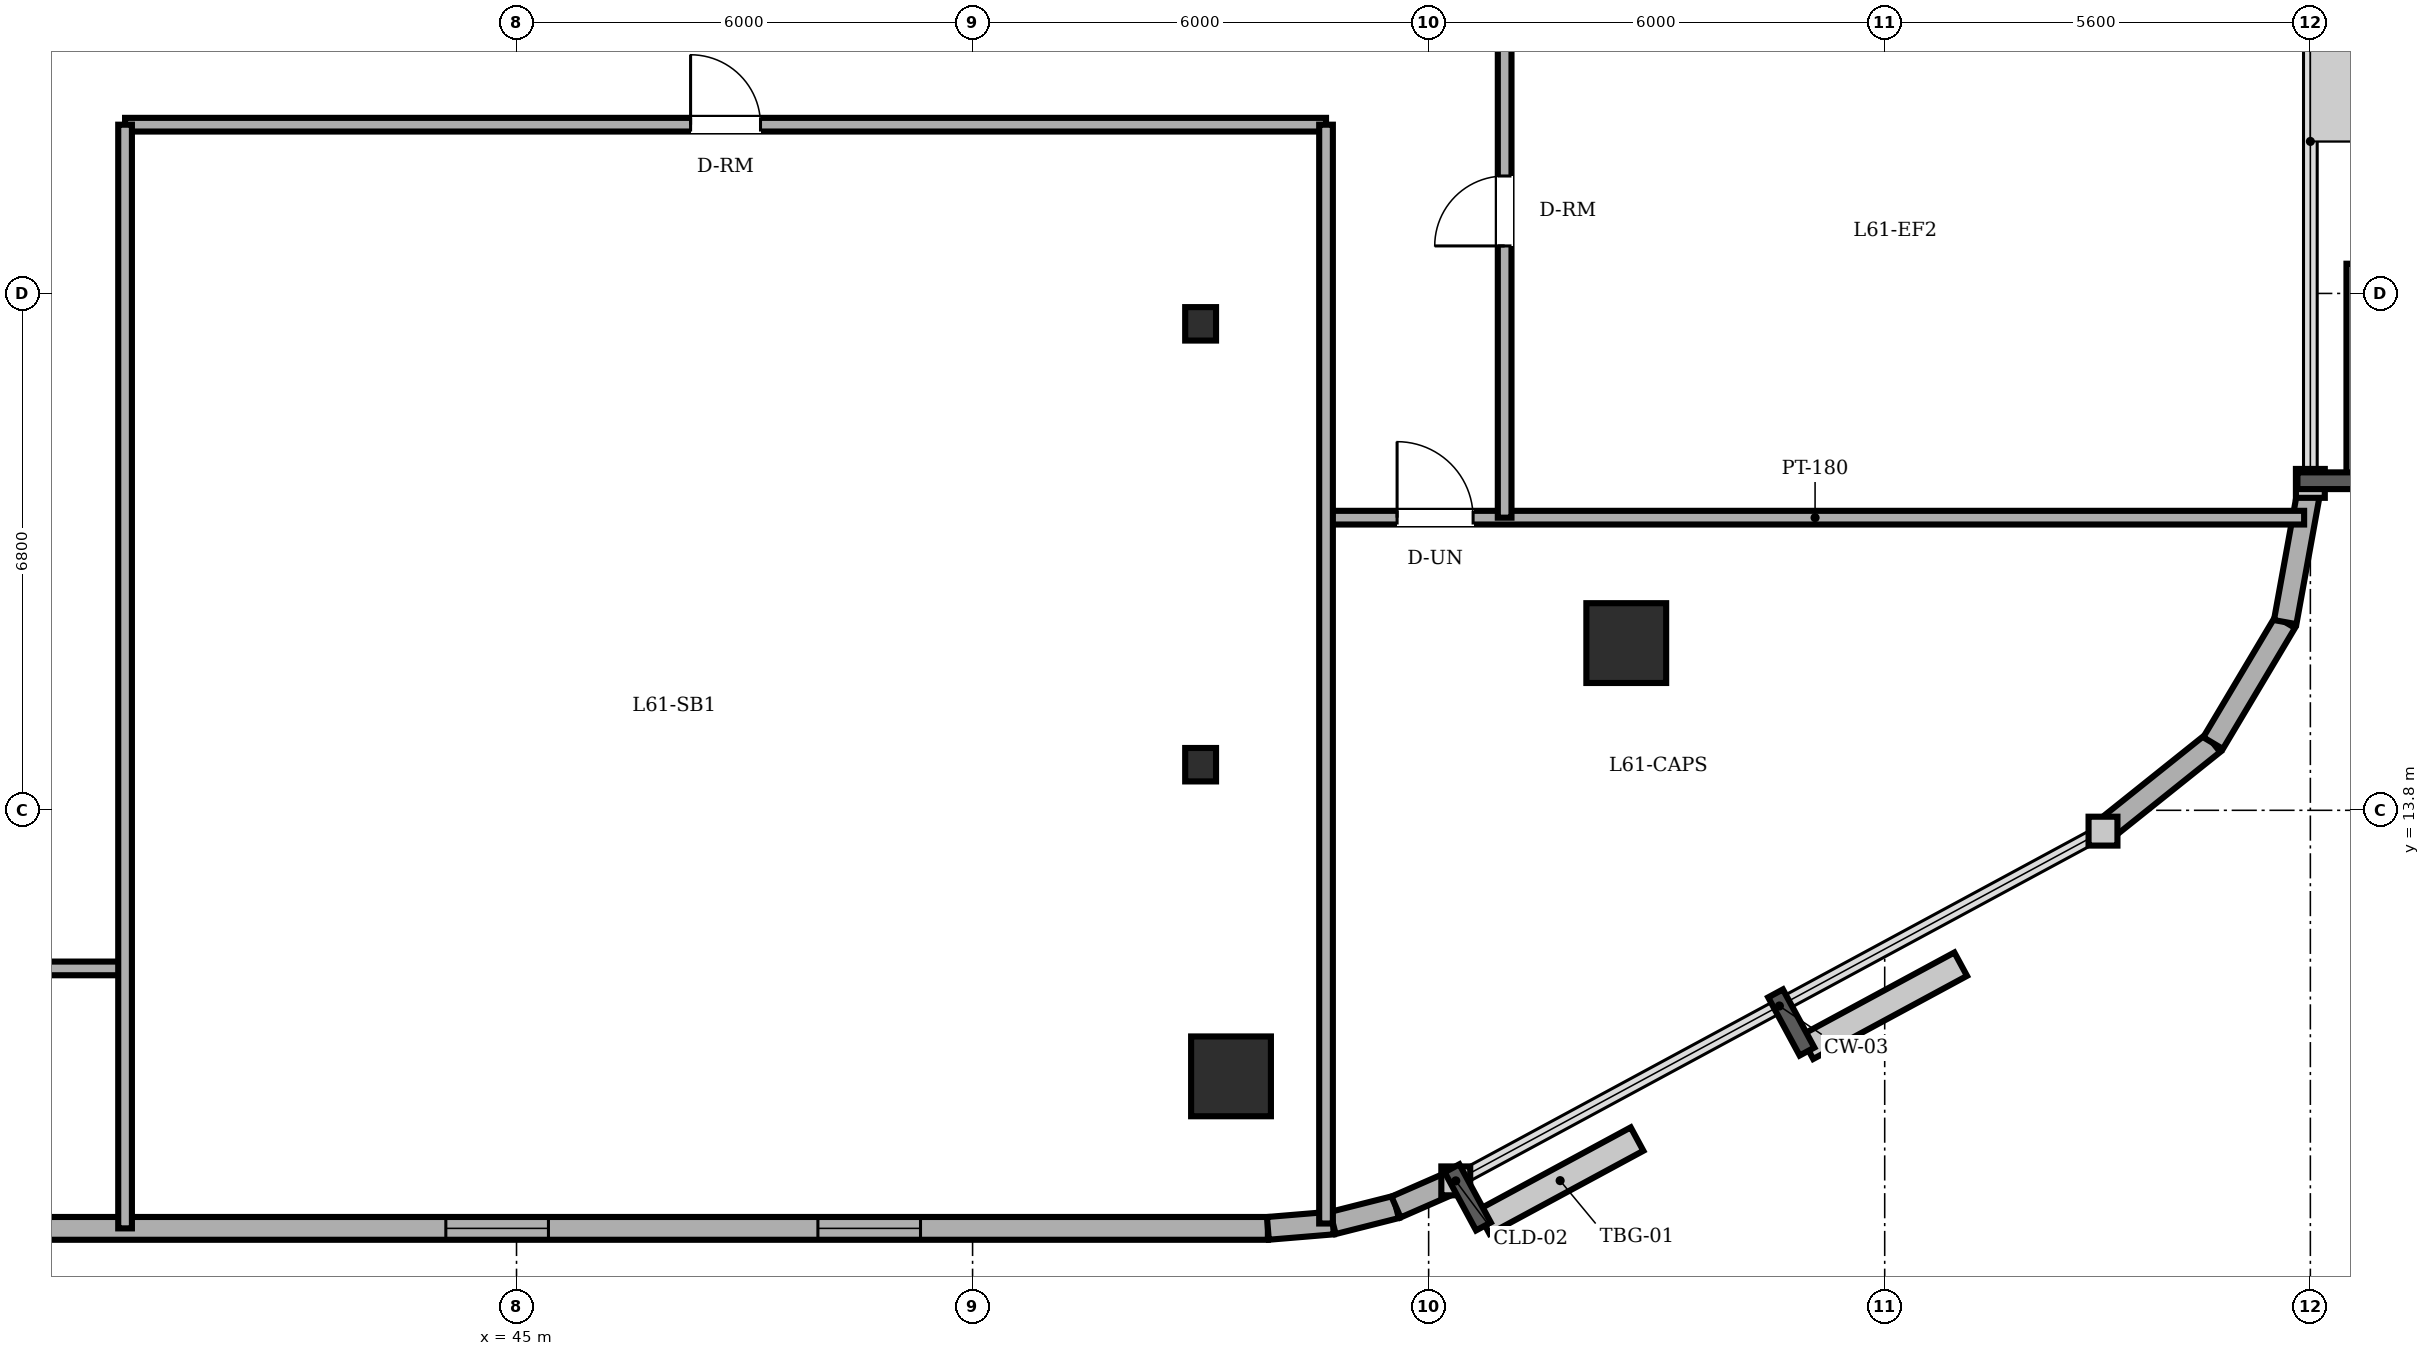
"""IFC4 building model, lengths in metres.
Left out: names, types, materials, properties, quantities, classifications, styles, units other than length and angle.
Written with IfcOpenShell. Run it as: python <this file> out.ifc"""

import sys

from ifc_helpers import new_model, si_unit, direction, frame, frame_2d, origin, origin_2d, place, context, subcontext, project, spatial, rectangle, circle, i_section, extrude, element, fill, save


model = new_model("IFC4")
c1 = context("Model", 3, precision=1e-05, world=origin(), true_north=direction((0.0, 1.0)))
c2 = subcontext(c1, "Body", "Model", "MODEL_VIEW")
j1 = project(units=[si_unit("LENGTHUNIT", "METRE"), si_unit("PLANEANGLEUNIT", "RADIAN")], contexts=[c1])
p1 = place(None, origin())
s1 = spatial("IfcSite", under=j1, at=p1, CompositionType="ELEMENT")
p2 = place(p1, origin())
s2 = spatial("IfcBuilding", under=s1, at=p2, CompositionType="ELEMENT")
p3 = place(p2, frame((0.0, 0.0, 233.7)))
s3 = spatial("IfcBuildingStorey", under=s2, at=p3, CompositionType="ELEMENT", Elevation=233.7)
for number, where, z_axis, x_axis in (
    (1, (54.4, 10.3, 0.0), (0.0, 0.0, 1.0), (1.0, 0.0, 0.0)),
    (2, (59.6, 16.0, 0.0), (0.0, 0.0, 1.0), (1.0, 0.0, 0.0)),
):
    element("IfcColumn", number, at=place(p3, frame(where, z_axis=z_axis, x_axis=x_axis)), inside=s3, PredefinedType="COLUMN", context=c2, shape_type="SweptSolid", body=[
        extrude(circle(Radius=0.525, at=origin_2d()), origin(), (0.0, 0.0, 1.0), 3.6),
    ])
for number, where, z_axis, x_axis in (
    (3, (54.0, 14.4, 0.0), (0.0, 0.0, 1.0), (1.0, 0.0, 0.0)),
    (4, (54.0, 20.2, 0.0), (0.0, 0.0, 1.0), (1.0, 0.0, 0.0)),
):
    element("IfcColumn", number, at=place(p3, frame(where, z_axis=z_axis, x_axis=x_axis)), inside=s3, PredefinedType="COLUMN", context=c2, shape_type="SweptSolid", body=[
        extrude(i_section(OverallWidth=0.406, OverallDepth=0.44, WebThickness=0.024, FlangeThickness=0.039, FilletRadius=0.015, at=origin_2d()), origin(), (0.0, 0.0, 1.0), 3.6),
    ])
p4 = place(p3, frame((22.4, 8.3, 0.0), z_axis=(0.0, 0.0, 1.0), x_axis=(1.0, 0.0, 0.0)))
e5 = element("IfcWall", 5, at=p4, inside=s3, PredefinedType="SOLIDWALL", context=c2, shape_type="SweptSolid", body=[
    extrude(rectangle(XDim=32.485, YDim=0.3, at=frame_2d((16.243, 0.0))), origin(), (0.0, 0.0, 1.0), 3.4),
])
p5 = place(p4, frame((7.875, 0.0, 0.0)))
e6 = element("IfcOpeningElement", 6, at=p5, cuts=e5, PredefinedType="OPENING", context=c2, shape_type="SweptSolid", body=[
    extrude(rectangle(XDim=0.95, YDim=2.2, at=frame_2d((0.475, 1.1))), frame((0.0, 0.16, 0.0), z_axis=(0.0, -1.0, 0.0), x_axis=(1.0, 0.0, 0.0)), (0.0, 0.0, 1.0), 0.32),
])
p6 = place(p4, frame((1.3, 0.0, 0.85)))
e7 = element("IfcOpeningElement", 7, at=p6, cuts=e5, PredefinedType="OPENING", context=c2, shape_type="SweptSolid", body=[
    extrude(rectangle(XDim=1.35, YDim=1.55, at=frame_2d((0.675, 0.775))), frame((0.0, 0.16, 0.0), z_axis=(0.0, -1.0, 0.0), x_axis=(1.0, 0.0, 0.0)), (0.0, 0.0, 1.0), 0.32),
])
p7 = place(p4, frame((4.825, 0.0, 0.85)))
e8 = element("IfcOpeningElement", 8, at=p7, cuts=e5, PredefinedType="OPENING", context=c2, shape_type="SweptSolid", body=[
    extrude(rectangle(XDim=1.35, YDim=1.55, at=frame_2d((0.675, 0.775))), frame((0.0, 0.16, 0.0), z_axis=(0.0, -1.0, 0.0), x_axis=(1.0, 0.0, 0.0)), (0.0, 0.0, 1.0), 0.32),
])
p8 = place(p4, frame((10.075, 0.0, 0.85)))
e9 = element("IfcOpeningElement", 9, at=p8, cuts=e5, PredefinedType="OPENING", context=c2, shape_type="SweptSolid", body=[
    extrude(rectangle(XDim=1.35, YDim=1.55, at=frame_2d((0.675, 0.775))), frame((0.0, 0.16, 0.0), z_axis=(0.0, -1.0, 0.0), x_axis=(1.0, 0.0, 0.0)), (0.0, 0.0, 1.0), 0.32),
])
p9 = place(p4, frame((13.425, 0.0, 0.85)))
e10 = element("IfcOpeningElement", 10, at=p9, cuts=e5, PredefinedType="OPENING", context=c2, shape_type="SweptSolid", body=[
    extrude(rectangle(XDim=1.35, YDim=1.55, at=frame_2d((0.675, 0.775))), frame((0.0, 0.16, 0.0), z_axis=(0.0, -1.0, 0.0), x_axis=(1.0, 0.0, 0.0)), (0.0, 0.0, 1.0), 0.32),
])
p10 = place(p4, frame((21.67, 0.0, 0.85)))
e11 = element("IfcOpeningElement", 11, at=p10, cuts=e5, PredefinedType="OPENING", context=c2, shape_type="SweptSolid", body=[
    extrude(rectangle(XDim=1.35, YDim=1.55, at=frame_2d((0.675, 0.775))), frame((0.0, 0.16, 0.0), z_axis=(0.0, -1.0, 0.0), x_axis=(1.0, 0.0, 0.0)), (0.0, 0.0, 1.0), 0.32),
])
p11 = place(p4, frame((26.565, 0.0, 0.85)))
e12 = element("IfcOpeningElement", 12, at=p11, cuts=e5, PredefinedType="OPENING", context=c2, shape_type="SweptSolid", body=[
    extrude(rectangle(XDim=1.35, YDim=1.55, at=frame_2d((0.675, 0.775))), frame((0.0, 0.16, 0.0), z_axis=(0.0, -1.0, 0.0), x_axis=(1.0, 0.0, 0.0)), (0.0, 0.0, 1.0), 0.32),
])
p12 = place(p3, frame((54.885, 8.3, 0.0), z_axis=(0.0, 0.0, 1.0), x_axis=(0.996565355958, 0.082809971041, 0.0)))
e13 = element("IfcWall", 13, at=p12, inside=s3, PredefinedType="SOLIDWALL", context=c2, shape_type="SweptSolid", body=[
    extrude(rectangle(XDim=0.858, YDim=0.3, at=frame_2d((0.429, 0.0))), origin(), (0.0, 0.0, 1.0), 3.4),
])
p13 = place(p3, frame((55.74, 8.371, 0.0), z_axis=(0.0, 0.0, 1.0), x_axis=(0.969536346338, 0.244947490555, 0.0)))
e14 = element("IfcWall", 14, at=p13, inside=s3, PredefinedType="SOLIDWALL", context=c2, shape_type="SweptSolid", body=[
    extrude(rectangle(XDim=0.857, YDim=0.3, at=frame_2d((0.429, 0.0))), origin(), (0.0, 0.0, 1.0), 3.4),
])
p14 = place(p3, frame((56.571, 8.581, 0.0), z_axis=(0.0, 0.0, 1.0), x_axis=(0.916085473636, 0.400983048261, 0.0)))
e15 = element("IfcWall", 15, at=p14, inside=s3, PredefinedType="SOLIDWALL", context=c2, shape_type="SweptSolid", body=[
    extrude(rectangle(XDim=0.858, YDim=0.3, at=frame_2d((0.429, 0.0))), origin(), (0.0, 0.0, 1.0), 3.4),
])
p15 = place(p3, frame((65.872, 13.526, 0.0), z_axis=(0.0, 0.0, 1.0), x_axis=(0.780920189257, 0.624630817372, 0.0)))
e16 = element("IfcWall", 16, at=p15, inside=s3, PredefinedType="SOLIDWALL", context=c2, shape_type="SweptSolid", body=[
    extrude(rectangle(XDim=1.854, YDim=0.3, at=frame_2d((0.927, 0.0))), origin(), (0.0, 0.0, 1.0), 3.4),
])
p16 = place(p3, frame((67.32, 14.684, 0.0), z_axis=(0.0, 0.0, 1.0), x_axis=(0.512072018927, 0.858942516955, 0.0)))
e17 = element("IfcWall", 17, at=p16, inside=s3, PredefinedType="SOLIDWALL", context=c2, shape_type="SweptSolid", body=[
    extrude(rectangle(XDim=1.853, YDim=0.3, at=frame_2d((0.927, 0.0))), origin(), (0.0, 0.0, 1.0), 3.4),
])
p17 = place(p3, frame((68.269, 16.276, 0.0), z_axis=(0.0, 0.0, 1.0), x_axis=(0.178468469252, 0.983945631365, 0.0)))
e18 = element("IfcWall", 18, at=p17, inside=s3, PredefinedType="SOLIDWALL", context=c2, shape_type="SweptSolid", body=[
    extrude(rectangle(XDim=1.855, YDim=0.3, at=frame_2d((0.927, 0.0))), origin(), (0.0, 0.0, 1.0), 3.4),
])
p18 = place(p3, frame((17.677, 11.72, 0.0), z_axis=(0.0, 0.0, 1.0), x_axis=(1.0, 0.0, 0.0)))
e19 = element("IfcWall", 19, at=p18, inside=s3, PredefinedType="PARTITIONING", context=c2, shape_type="SweptSolid", body=[
    extrude(rectangle(XDim=22.173, YDim=0.18, at=frame_2d((11.086, 0.0))), origin(), (0.0, 0.0, 1.0), 3.4),
])
p19 = place(p18, frame((9.763, 0.0, 0.0)))
e20 = element("IfcOpeningElement", 20, at=p19, cuts=e19, PredefinedType="OPENING", context=c2, shape_type="SweptSolid", body=[
    extrude(rectangle(XDim=0.92, YDim=2.1, at=frame_2d((0.46, 1.05))), frame((0.0, 0.1, 0.0), z_axis=(0.0, -1.0, 0.0), x_axis=(1.0, 0.0, 0.0)), (0.0, 0.0, 1.0), 0.2),
])
p20 = place(p18, frame((4.063, 0.0, 0.0)))
e21 = element("IfcOpeningElement", 21, at=p20, cuts=e19, PredefinedType="OPENING", context=c2, shape_type="SweptSolid", body=[
    extrude(rectangle(XDim=0.92, YDim=2.1, at=frame_2d((0.46, 1.05))), frame((0.0, 0.1, 0.0), z_axis=(0.0, -1.0, 0.0), x_axis=(1.0, 0.0, 0.0)), (0.0, 0.0, 1.0), 0.2),
])
p21 = place(p18, frame((16.428, 0.0, 0.0)))
e22 = element("IfcOpeningElement", 22, at=p21, cuts=e19, PredefinedType="OPENING", context=c2, shape_type="SweptSolid", body=[
    extrude(rectangle(XDim=0.92, YDim=2.1, at=frame_2d((0.46, 1.05))), frame((0.0, 0.1, 0.0), z_axis=(0.0, -1.0, 0.0), x_axis=(1.0, 0.0, 0.0)), (0.0, 0.0, 1.0), 0.2),
])
p22 = place(p3, frame((55.65, 17.65, 0.0), z_axis=(0.0, 0.0, 1.0), x_axis=(1.0, 0.0, 0.0)))
e23 = element("IfcWall", 23, at=p22, inside=s3, PredefinedType="PARTITIONING", context=c2, shape_type="SweptSolid", body=[
    extrude(rectangle(XDim=12.868, YDim=0.18, at=frame_2d((6.434, 0.0))), origin(), (0.0, 0.0, 1.0), 3.4),
])
p23 = place(p22, frame((0.935, 0.0, 0.0)))
e24 = element("IfcOpeningElement", 24, at=p23, cuts=e23, PredefinedType="OPENING", context=c2, shape_type="SweptSolid", body=[
    extrude(rectangle(XDim=1.0, YDim=2.15, at=frame_2d((0.5, 1.075))), frame((0.0, 0.1, 0.0), z_axis=(0.0, -1.0, 0.0), x_axis=(1.0, 0.0, 0.0)), (0.0, 0.0, 1.0), 0.2),
])
p24 = place(p3, frame((39.85, 22.82, 0.0), z_axis=(0.0, 0.0, 1.0), x_axis=(1.0, 0.0, 0.0)))
e25 = element("IfcWall", 25, at=p24, inside=s3, PredefinedType="PARTITIONING", context=c2, shape_type="SweptSolid", body=[
    extrude(rectangle(XDim=15.8, YDim=0.18, at=frame_2d((7.9, 0.0))), origin(), (0.0, 0.0, 1.0), 3.4),
])
p25 = place(p24, frame((7.44, 0.0, 0.0)))
e26 = element("IfcOpeningElement", 26, at=p25, cuts=e25, PredefinedType="OPENING", context=c2, shape_type="SweptSolid", body=[
    extrude(rectangle(XDim=0.92, YDim=2.1, at=frame_2d((0.46, 1.05))), frame((0.0, 0.1, 0.0), z_axis=(0.0, -1.0, 0.0), x_axis=(1.0, 0.0, 0.0)), (0.0, 0.0, 1.0), 0.2),
])
p26 = place(p3, frame((39.85, 8.3, 0.0), z_axis=(0.0, 0.0, 1.0), x_axis=(0.0, 1.0, 0.0)))
e27 = element("IfcWall", 27, at=p26, inside=s3, PredefinedType="PARTITIONING", context=c2, shape_type="SweptSolid", body=[
    extrude(rectangle(XDim=14.52, YDim=0.18, at=frame_2d((7.26, 0.0))), origin(), (0.0, 0.0, 1.0), 3.4),
])
p27 = place(p3, frame((55.65, 8.364, 0.0), z_axis=(0.0, 0.0, 1.0), x_axis=(0.0, 1.0, 0.0)))
e28 = element("IfcWall", 28, at=p27, inside=s3, PredefinedType="PARTITIONING", context=c2, shape_type="SweptSolid", body=[
    extrude(rectangle(XDim=14.456, YDim=0.18, at=frame_2d((7.228, 0.0))), origin(), (0.0, 0.0, 1.0), 3.4),
])
p28 = place(p3, frame((58.0, 17.65, 0.0), z_axis=(0.0, 0.0, 1.0), x_axis=(0.0, 1.0, 0.0)))
e29 = element("IfcWall", 29, at=p28, inside=s3, PredefinedType="PARTITIONING", context=c2, shape_type="SweptSolid", body=[
    extrude(rectangle(XDim=12.7, YDim=0.18, at=frame_2d((6.35, 0.0))), origin(), (0.0, 0.0, 1.0), 3.4),
])
p29 = place(p28, frame((9.365, 0.0, 0.0)))
e30 = element("IfcOpeningElement", 30, at=p29, cuts=e29, PredefinedType="OPENING", context=c2, shape_type="SweptSolid", body=[
    extrude(rectangle(XDim=1.0, YDim=2.15, at=frame_2d((0.5, 1.075))), frame((0.0, 0.1, 0.0), z_axis=(0.0, -1.0, 0.0), x_axis=(1.0, 0.0, 0.0)), (0.0, 0.0, 1.0), 0.2),
])
p30 = place(p28, frame((3.575, 0.0, 0.0)))
e31 = element("IfcOpeningElement", 31, at=p30, cuts=e29, PredefinedType="OPENING", context=c2, shape_type="SweptSolid", body=[
    extrude(rectangle(XDim=0.92, YDim=2.1, at=frame_2d((0.46, 1.05))), frame((0.0, 0.1, 0.0), z_axis=(0.0, -1.0, 0.0), x_axis=(1.0, 0.0, 0.0)), (0.0, 0.0, 1.0), 0.2),
])
p31 = place(p10, origin())
e32 = element("IfcWindow", 32, at=p31, inside=s3, PartitioningType="SINGLE_PANEL", PredefinedType="WINDOW", context=c2, shape_type="SweptSolid", body=[
    extrude(rectangle(XDim=1.35, YDim=1.55, at=frame_2d((0.675, 0.775))), frame((0.0, 0.03, 0.0), z_axis=(0.0, -1.0, 0.0), x_axis=(1.0, 0.0, 0.0)), (0.0, 0.0, 1.0), 0.06),
])
fill(e11, e32)
p32 = place(p11, origin())
e33 = element("IfcWindow", 33, at=p32, inside=s3, PartitioningType="SINGLE_PANEL", PredefinedType="WINDOW", context=c2, shape_type="SweptSolid", body=[
    extrude(rectangle(XDim=1.35, YDim=1.55, at=frame_2d((0.675, 0.775))), frame((0.0, 0.03, 0.0), z_axis=(0.0, -1.0, 0.0), x_axis=(1.0, 0.0, 0.0)), (0.0, 0.0, 1.0), 0.06),
])
fill(e12, e33)
p33 = place(p25, origin())
e34 = element("IfcDoor", 34, at=p33, inside=s3, OperationType="SINGLE_SWING_LEFT", PredefinedType="DOOR", context=c2, shape_type="SweptSolid", body=[
    extrude(rectangle(XDim=0.92, YDim=2.1, at=frame_2d((0.46, 1.05))), frame((0.0, 0.025, 0.0), z_axis=(0.0, -1.0, 0.0), x_axis=(1.0, 0.0, 0.0)), (0.0, 0.0, 1.0), 0.05),
])
fill(e26, e34)
p34 = place(p23, origin())
e35 = element("IfcDoor", 35, at=p34, inside=s3, OperationType="SINGLE_SWING_LEFT", PredefinedType="DOOR", context=c2, shape_type="SweptSolid", body=[
    extrude(rectangle(XDim=1.0, YDim=2.15, at=frame_2d((0.5, 1.075))), frame((0.0, 0.025, 0.0), z_axis=(0.0, -1.0, 0.0), x_axis=(1.0, 0.0, 0.0)), (0.0, 0.0, 1.0), 0.05),
])
fill(e24, e35)
p35 = place(p30, origin())
e36 = element("IfcDoor", 36, at=p35, inside=s3, OperationType="SINGLE_SWING_LEFT", PredefinedType="DOOR", context=c2, shape_type="SweptSolid", body=[
    extrude(rectangle(XDim=0.92, YDim=2.1, at=frame_2d((0.46, 1.05))), frame((0.0, 0.025, 0.0), z_axis=(0.0, -1.0, 0.0), x_axis=(1.0, 0.0, 0.0)), (0.0, 0.0, 1.0), 0.05),
])
fill(e31, e36)
save(model, sys.argv[1])
